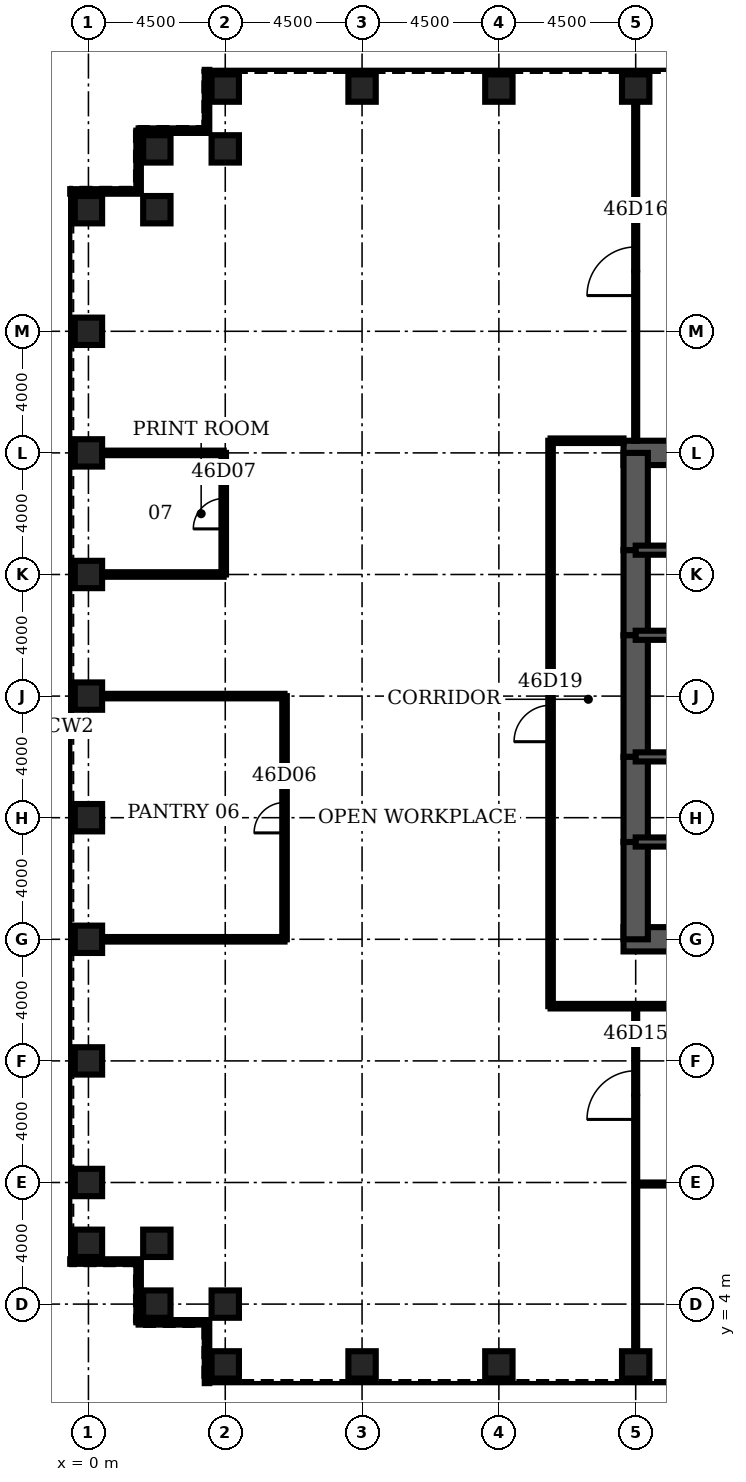
"""IFC4 building model, lengths in metres.
Left out: names, types, materials, properties, quantities, classifications, styles, units other than length and angle.
Written with IfcOpenShell. Run it as: python <this file> out.ifc"""

import sys

from ifc_helpers import new_model, si_unit, direction, frame, frame_2d, origin, origin_2d, place, context, subcontext, project, spatial, rectangle, hollow_rectangle, extrude, element, fill, save


model = new_model("IFC4")
c1 = context("Model", 3, precision=1e-05, world=origin(), true_north=direction((0.0, 1.0)))
c2 = subcontext(c1, "Body", "Model", "MODEL_VIEW")
j1 = project(units=[si_unit("LENGTHUNIT", "METRE"), si_unit("PLANEANGLEUNIT", "RADIAN")], contexts=[c1])
p1 = place(None, origin())
s1 = spatial("IfcSite", under=j1, at=p1, CompositionType="ELEMENT")
p2 = place(p1, origin())
s2 = spatial("IfcBuilding", under=s1, at=p2, CompositionType="ELEMENT")
p3 = place(p2, frame((0.0, 0.0, 206.8)))
s3 = spatial("IfcBuildingStorey", under=s2, at=p3, CompositionType="ELEMENT", Elevation=206.8)
for number, where, z_axis, x_axis in (
    (1, (4.5, 2.0, 0.0), (0.0, 0.0, 1.0), (0.0, 1.0, 0.0)),
    (2, (9.0, 2.0, 0.0), (0.0, 0.0, 1.0), (0.0, 1.0, 0.0)),
    (3, (13.5, 2.0, 0.0), (0.0, 0.0, 1.0), (0.0, 1.0, 0.0)),
    (4, (18.0, 2.0, 0.0), (0.0, 0.0, 1.0), (0.0, 1.0, 0.0)),
    (5, (18.0, 44.0, 0.0), (0.0, 0.0, 1.0), (0.0, 1.0, 0.0)),
    (6, (13.5, 44.0, 0.0), (0.0, 0.0, 1.0), (0.0, 1.0, 0.0)),
    (7, (9.0, 44.0, 0.0), (0.0, 0.0, 1.0), (0.0, 1.0, 0.0)),
    (8, (4.5, 44.0, 0.0), (0.0, 0.0, 1.0), (0.0, 1.0, 0.0)),
    (9, (4.5, 42.0, 0.0), (0.0, 0.0, 1.0), (0.0, 1.0, 0.0)),
    (10, (2.25, 42.0, 0.0), (0.0, 0.0, 1.0), (1.0, 0.0, 0.0)),
    (11, (2.25, 40.0, 0.0), (0.0, 0.0, 1.0), (1.0, 0.0, 0.0)),
    (12, (0.0, 40.0, 0.0), (0.0, 0.0, 1.0), (1.0, 0.0, 0.0)),
    (13, (0.0, 36.0, 0.0), (0.0, 0.0, 1.0), (1.0, 0.0, 0.0)),
    (14, (0.0, 32.0, 0.0), (0.0, 0.0, 1.0), (1.0, 0.0, 0.0)),
    (15, (0.0, 28.0, 0.0), (0.0, 0.0, 1.0), (1.0, 0.0, 0.0)),
    (16, (0.0, 24.0, 0.0), (0.0, 0.0, 1.0), (1.0, 0.0, 0.0)),
    (17, (0.0, 20.0, 0.0), (0.0, 0.0, 1.0), (1.0, 0.0, 0.0)),
    (18, (0.0, 16.0, 0.0), (0.0, 0.0, 1.0), (1.0, 0.0, 0.0)),
    (19, (0.0, 12.0, 0.0), (0.0, 0.0, 1.0), (1.0, 0.0, 0.0)),
    (20, (0.0, 8.0, 0.0), (0.0, 0.0, 1.0), (1.0, 0.0, 0.0)),
    (21, (0.0, 6.0, 0.0), (0.0, 0.0, 1.0), (1.0, 0.0, 0.0)),
    (22, (2.25, 6.0, 0.0), (0.0, 0.0, 1.0), (1.0, 0.0, 0.0)),
    (23, (2.25, 4.0, 0.0), (0.0, 0.0, 1.0), (1.0, 0.0, 0.0)),
    (24, (4.5, 4.0, 0.0), (0.0, 0.0, 1.0), (0.0, 1.0, 0.0)),
):
    element("IfcColumn", number, at=place(p3, frame(where, z_axis=z_axis, x_axis=x_axis)), inside=s3, PredefinedType="COLUMN", context=c2, shape_type="SweptSolid", body=[
        extrude(hollow_rectangle(XDim=0.9, YDim=0.9, WallThickness=0.08, at=origin_2d()), origin(), (0.0, 0.0, 1.0), 4.2),
    ])
for number, where, z_axis, x_axis in (
    (25, (17.6, 16.0, 0.0), (0.0, 0.0, 1.0), (1.0, 0.0, 0.0)),
    (26, (27.0, 32.0, 0.0), (0.0, 0.0, 1.0), (-1.0, 0.0, 0.0)),
):
    element("IfcWall", number, at=place(p3, frame(where, z_axis=z_axis, x_axis=x_axis)), inside=s3, PredefinedType="SHEAR", context=c2, shape_type="SweptSolid", body=[
        extrude(rectangle(XDim=9.4, YDim=0.8, at=frame_2d((4.7, 0.0))), origin(), (0.0, 0.0, 1.0), 4.2),
    ])
p4 = place(p3, frame((18.0, 32.0, 0.0), z_axis=(0.0, 0.0, 1.0), x_axis=(0.0, -1.0, 0.0)))
e27 = element("IfcWall", 27, at=p4, inside=s3, PredefinedType="SHEAR", context=c2, shape_type="SweptSolid", body=[
    extrude(rectangle(XDim=3.2, YDim=0.8, at=frame_2d((1.6, 0.0))), origin(), (0.0, 0.0, 1.0), 4.2),
])
p5 = place(p3, frame((18.0, 28.8, 0.0), z_axis=(0.0, 0.0, 1.0), x_axis=(0.0, -1.0, 0.0)))
e28 = element("IfcWall", 28, at=p5, inside=s3, PredefinedType="SHEAR", context=c2, shape_type="SweptSolid", body=[
    extrude(rectangle(XDim=2.8, YDim=0.8, at=frame_2d((1.4, 0.0))), origin(), (0.0, 0.0, 1.0), 4.2),
])
p6 = place(p5, frame((0.4, 0.0, 0.0)))
e29 = element("IfcOpeningElement", 29, at=p6, cuts=e28, PredefinedType="OPENING", context=c2, shape_type="SweptSolid", body=[
    extrude(rectangle(XDim=1.8, YDim=2.1, at=frame_2d((0.9, 1.05))), frame((0.0, 0.41, 0.0), z_axis=(0.0, -1.0, 0.0), x_axis=(1.0, 0.0, 0.0)), (0.0, 0.0, 1.0), 0.82),
])
p7 = place(p3, frame((18.0, 26.0, 0.0), z_axis=(0.0, 0.0, 1.0), x_axis=(0.0, -1.0, 0.0)))
e30 = element("IfcWall", 30, at=p7, inside=s3, PredefinedType="SHEAR", context=c2, shape_type="SweptSolid", body=[
    extrude(rectangle(XDim=4.0, YDim=0.8, at=frame_2d((2.0, 0.0))), origin(), (0.0, 0.0, 1.0), 4.2),
])
p8 = place(p3, frame((18.0, 22.0, 0.0), z_axis=(0.0, 0.0, 1.0), x_axis=(0.0, -1.0, 0.0)))
e31 = element("IfcWall", 31, at=p8, inside=s3, PredefinedType="SHEAR", context=c2, shape_type="SweptSolid", body=[
    extrude(rectangle(XDim=2.8, YDim=0.8, at=frame_2d((1.4, 0.0))), origin(), (0.0, 0.0, 1.0), 4.2),
])
p9 = place(p8, frame((0.6, 0.0, 0.0)))
e32 = element("IfcOpeningElement", 32, at=p9, cuts=e31, PredefinedType="OPENING", context=c2, shape_type="SweptSolid", body=[
    extrude(rectangle(XDim=1.8, YDim=2.1, at=frame_2d((0.9, 1.05))), frame((0.0, 0.41, 0.0), z_axis=(0.0, -1.0, 0.0), x_axis=(1.0, 0.0, 0.0)), (0.0, 0.0, 1.0), 0.82),
])
p10 = place(p3, frame((18.0, 19.2, 0.0), z_axis=(0.0, 0.0, 1.0), x_axis=(0.0, -1.0, 0.0)))
e33 = element("IfcWall", 33, at=p10, inside=s3, PredefinedType="SHEAR", context=c2, shape_type="SweptSolid", body=[
    extrude(rectangle(XDim=3.2, YDim=0.8, at=frame_2d((1.6, 0.0))), origin(), (0.0, 0.0, 1.0), 4.2),
])
p11 = place(p3, frame((18.0, 19.2, 0.0), z_axis=(0.0, 0.0, 1.0), x_axis=(1.0, 0.0, 0.0)))
e34 = element("IfcWall", 34, at=p11, inside=s3, PredefinedType="SOLIDWALL", context=c2, shape_type="SweptSolid", body=[
    extrude(rectangle(XDim=9.0, YDim=0.3, at=frame_2d((4.5, 0.0))), origin(), (0.0, 0.0, 1.0), 4.2),
])
p12 = place(p11, frame((0.65, 0.0, 0.0)))
e35 = element("IfcOpeningElement", 35, at=p12, cuts=e34, PredefinedType="OPENING", context=c2, shape_type="SweptSolid", body=[
    extrude(rectangle(XDim=1.0, YDim=2.1, at=frame_2d((0.5, 1.05))), frame((0.0, 0.16, 0.0), z_axis=(0.0, -1.0, 0.0), x_axis=(1.0, 0.0, 0.0)), (0.0, 0.0, 1.0), 0.32),
])
p13 = place(p3, frame((18.0, 28.8, 0.0), z_axis=(0.0, 0.0, 1.0), x_axis=(1.0, 0.0, 0.0)))
e36 = element("IfcWall", 36, at=p13, inside=s3, PredefinedType="SOLIDWALL", context=c2, shape_type="SweptSolid", body=[
    extrude(rectangle(XDim=9.0, YDim=0.3, at=frame_2d((4.5, 0.0))), origin(), (0.0, 0.0, 1.0), 4.2),
])
p14 = place(p13, frame((0.65, 0.0, 0.0)))
e37 = element("IfcOpeningElement", 37, at=p14, cuts=e36, PredefinedType="OPENING", context=c2, shape_type="SweptSolid", body=[
    extrude(rectangle(XDim=1.0, YDim=2.1, at=frame_2d((0.5, 1.05))), frame((0.0, 0.16, 0.0), z_axis=(0.0, -1.0, 0.0), x_axis=(1.0, 0.0, 0.0)), (0.0, 0.0, 1.0), 0.32),
])
p15 = place(p3, frame((18.0, 22.0, 0.0), z_axis=(0.0, 0.0, 1.0), x_axis=(1.0, 0.0, 0.0)))
e38 = element("IfcWall", 38, at=p15, inside=s3, PredefinedType="SOLIDWALL", context=c2, shape_type="SweptSolid", body=[
    extrude(rectangle(XDim=6.0, YDim=0.3, at=frame_2d((3.0, 0.0))), origin(), (0.0, 0.0, 1.0), 4.2),
])
p16 = place(p15, frame((4.4, 0.0, 0.0)))
e39 = element("IfcOpeningElement", 39, at=p16, cuts=e38, PredefinedType="OPENING", context=c2, shape_type="SweptSolid", body=[
    extrude(rectangle(XDim=1.0, YDim=2.1, at=frame_2d((0.5, 1.05))), frame((0.0, 0.16, 0.0), z_axis=(0.0, -1.0, 0.0), x_axis=(1.0, 0.0, 0.0)), (0.0, 0.0, 1.0), 0.32),
])
p17 = place(p15, frame((0.95, 0.0, 0.0)))
e40 = element("IfcOpeningElement", 40, at=p17, cuts=e38, PredefinedType="OPENING", context=c2, shape_type="SweptSolid", body=[
    extrude(rectangle(XDim=1.0, YDim=2.1, at=frame_2d((0.5, 1.05))), frame((0.0, 0.16, 0.0), z_axis=(0.0, -1.0, 0.0), x_axis=(1.0, 0.0, 0.0)), (0.0, 0.0, 1.0), 0.32),
])
p18 = place(p3, frame((18.0, 26.0, 0.0), z_axis=(0.0, 0.0, 1.0), x_axis=(1.0, 0.0, 0.0)))
e41 = element("IfcWall", 41, at=p18, inside=s3, PredefinedType="SOLIDWALL", context=c2, shape_type="SweptSolid", body=[
    extrude(rectangle(XDim=6.0, YDim=0.3, at=frame_2d((3.0, 0.0))), origin(), (0.0, 0.0, 1.0), 4.2),
])
p19 = place(p3, frame((18.0, 7.95, 0.0), z_axis=(0.0, 0.0, 1.0), x_axis=(1.0, 0.0, 0.0)))
e42 = element("IfcWall", 42, at=p19, inside=s3, PredefinedType="PARTITIONING", context=c2, shape_type="SweptSolid", body=[
    extrude(rectangle(XDim=27.0, YDim=0.1, at=frame_2d((13.5, 0.0))), origin(), (0.0, 0.0, 1.0), 3.0),
])
p20 = place(p19, frame((4.0, 0.0, 0.0)))
e43 = element("IfcOpeningElement", 43, at=p20, cuts=e42, PredefinedType="OPENING", context=c2, shape_type="SweptSolid", body=[
    extrude(rectangle(XDim=1.0, YDim=2.1, at=frame_2d((0.5, 1.05))), frame((0.0, 0.06, 0.0), z_axis=(0.0, -1.0, 0.0), x_axis=(1.0, 0.0, 0.0)), (0.0, 0.0, 1.0), 0.12),
])
p21 = place(p19, frame((13.0, 0.0, 0.0)))
e44 = element("IfcOpeningElement", 44, at=p21, cuts=e42, PredefinedType="OPENING", context=c2, shape_type="SweptSolid", body=[
    extrude(rectangle(XDim=1.0, YDim=2.1, at=frame_2d((0.5, 1.05))), frame((0.0, 0.06, 0.0), z_axis=(0.0, -1.0, 0.0), x_axis=(1.0, 0.0, 0.0)), (0.0, 0.0, 1.0), 0.12),
])
p22 = place(p19, frame((22.0, 0.0, 0.0)))
e45 = element("IfcOpeningElement", 45, at=p22, cuts=e42, PredefinedType="OPENING", context=c2, shape_type="SweptSolid", body=[
    extrude(rectangle(XDim=1.0, YDim=2.1, at=frame_2d((0.5, 1.05))), frame((0.0, 0.06, 0.0), z_axis=(0.0, -1.0, 0.0), x_axis=(1.0, 0.0, 0.0)), (0.0, 0.0, 1.0), 0.12),
])
p23 = place(p3, frame((15.2, 13.8, 0.0), z_axis=(0.0, 0.0, 1.0), x_axis=(1.0, 0.0, 0.0)))
e46 = element("IfcWall", 46, at=p23, inside=s3, PredefinedType="PARTITIONING", context=c2, shape_type="SweptSolid", body=[
    extrude(rectangle(XDim=41.6, YDim=0.15, at=frame_2d((20.8, 0.0))), origin(), (0.0, 0.0, 1.0), 3.0),
])
p24 = place(p23, frame((20.2, 0.0, 0.0)))
e47 = element("IfcOpeningElement", 47, at=p24, cuts=e46, PredefinedType="OPENING", context=c2, shape_type="SweptSolid", body=[
    extrude(rectangle(XDim=1.2, YDim=2.1, at=frame_2d((0.6, 1.05))), frame((0.0, 0.085, 0.0), z_axis=(0.0, -1.0, 0.0), x_axis=(1.0, 0.0, 0.0)), (0.0, 0.0, 1.0), 0.17),
])
for number, where, z_axis, x_axis in (
    (48, (0.45, 16.0, 0.0), (0.0, 0.0, 1.0), (1.0, 0.0, 0.0)),
    (49, (0.45, 24.0, 0.0), (0.0, 0.0, 1.0), (1.0, 0.0, 0.0)),
):
    element("IfcWall", number, at=place(p3, frame(where, z_axis=z_axis, x_axis=x_axis)), inside=s3, PredefinedType="PARTITIONING", context=c2, shape_type="SweptSolid", body=[
        extrude(rectangle(XDim=6.0, YDim=0.15, at=frame_2d((3.0, 0.0))), origin(), (0.0, 0.0, 1.0), 3.0),
    ])
for number, where, z_axis, x_axis in (
    (50, (0.45, 28.0, 0.0), (0.0, 0.0, 1.0), (1.0, 0.0, 0.0)),
    (51, (0.45, 32.0, 0.0), (0.0, 0.0, 1.0), (1.0, 0.0, 0.0)),
):
    element("IfcWall", number, at=place(p3, frame(where, z_axis=z_axis, x_axis=x_axis)), inside=s3, PredefinedType="PARTITIONING", context=c2, shape_type="SweptSolid", body=[
        extrude(rectangle(XDim=4.0, YDim=0.15, at=frame_2d((2.0, 0.0))), origin(), (0.0, 0.0, 1.0), 3.0),
    ])
p25 = place(p3, frame((15.2, 32.4, 0.0), z_axis=(0.0, 0.0, 1.0), x_axis=(1.0, 0.0, 0.0)))
e52 = element("IfcWall", 52, at=p25, inside=s3, PredefinedType="PARTITIONING", context=c2, shape_type="SweptSolid", body=[
    extrude(rectangle(XDim=2.4, YDim=0.15, at=frame_2d((1.2, 0.0))), origin(), (0.0, 0.0, 1.0), 3.0),
])
p26 = place(p3, frame((4.45, 28.0, 0.0), z_axis=(0.0, 0.0, 1.0), x_axis=(0.0, 1.0, 0.0)))
e53 = element("IfcWall", 53, at=p26, inside=s3, PredefinedType="PARTITIONING", context=c2, shape_type="SweptSolid", body=[
    extrude(rectangle(XDim=4.0, YDim=0.15, at=frame_2d((2.0, 0.0))), origin(), (0.0, 0.0, 1.0), 3.0),
])
p27 = place(p26, frame((1.5, 0.0, 0.0)))
e54 = element("IfcOpeningElement", 54, at=p27, cuts=e53, PredefinedType="OPENING", context=c2, shape_type="SweptSolid", body=[
    extrude(rectangle(XDim=1.0, YDim=2.1, at=frame_2d((0.5, 1.05))), frame((0.0, 0.085, 0.0), z_axis=(0.0, -1.0, 0.0), x_axis=(1.0, 0.0, 0.0)), (0.0, 0.0, 1.0), 0.17),
])
p28 = place(p3, frame((6.45, 16.0, 0.0), z_axis=(0.0, 0.0, 1.0), x_axis=(0.0, 1.0, 0.0)))
e55 = element("IfcWall", 55, at=p28, inside=s3, PredefinedType="PARTITIONING", context=c2, shape_type="SweptSolid", body=[
    extrude(rectangle(XDim=8.0, YDim=0.15, at=frame_2d((4.0, 0.0))), origin(), (0.0, 0.0, 1.0), 3.0),
])
p29 = place(p28, frame((3.5, 0.0, 0.0)))
e56 = element("IfcOpeningElement", 56, at=p29, cuts=e55, PredefinedType="OPENING", context=c2, shape_type="SweptSolid", body=[
    extrude(rectangle(XDim=1.0, YDim=2.1, at=frame_2d((0.5, 1.05))), frame((0.0, 0.085, 0.0), z_axis=(0.0, -1.0, 0.0), x_axis=(1.0, 0.0, 0.0)), (0.0, 0.0, 1.0), 0.17),
])
p30 = place(p3, frame((15.2, 13.8, 0.0), z_axis=(0.0, 0.0, 1.0), x_axis=(0.0, 1.0, 0.0)))
e57 = element("IfcWall", 57, at=p30, inside=s3, PredefinedType="PARTITIONING", context=c2, shape_type="SweptSolid", body=[
    extrude(rectangle(XDim=18.6, YDim=0.15, at=frame_2d((9.3, 0.0))), origin(), (0.0, 0.0, 1.0), 3.0),
])
p31 = place(p30, frame((8.7, 0.0, 0.0)))
e58 = element("IfcOpeningElement", 58, at=p31, cuts=e57, PredefinedType="OPENING", context=c2, shape_type="SweptSolid", body=[
    extrude(rectangle(XDim=1.2, YDim=2.1, at=frame_2d((0.6, 1.05))), frame((0.0, 0.085, 0.0), z_axis=(0.0, -1.0, 0.0), x_axis=(1.0, 0.0, 0.0)), (0.0, 0.0, 1.0), 0.17),
])
p32 = place(p3, frame((18.0, 2.45, 0.0), z_axis=(0.0, 0.0, 1.0), x_axis=(0.0, 1.0, 0.0)))
e59 = element("IfcWall", 59, at=p32, inside=s3, PredefinedType="PARTITIONING", context=c2, shape_type="SweptSolid", body=[
    extrude(rectangle(XDim=11.35, YDim=0.1, at=frame_2d((5.675, 0.0))), origin(), (0.0, 0.0, 1.0), 3.0),
])
p33 = place(p32, frame((7.625, 0.0, 0.0)))
e60 = element("IfcOpeningElement", 60, at=p33, cuts=e59, PredefinedType="OPENING", context=c2, shape_type="SweptSolid", body=[
    extrude(rectangle(XDim=1.6, YDim=2.1, at=frame_2d((0.8, 1.05))), frame((0.0, 0.06, 0.0), z_axis=(0.0, -1.0, 0.0), x_axis=(1.0, 0.0, 0.0)), (0.0, 0.0, 1.0), 0.12),
])
p34 = place(p3, frame((18.0, 32.4, 0.0), z_axis=(0.0, 0.0, 1.0), x_axis=(0.0, 1.0, 0.0)))
e61 = element("IfcWall", 61, at=p34, inside=s3, PredefinedType="PARTITIONING", context=c2, shape_type="SweptSolid", body=[
    extrude(rectangle(XDim=11.15, YDim=0.1, at=frame_2d((5.575, 0.0))), origin(), (0.0, 0.0, 1.0), 3.0),
])
p35 = place(p34, frame((4.775, 0.0, 0.0)))
e62 = element("IfcOpeningElement", 62, at=p35, cuts=e61, PredefinedType="OPENING", context=c2, shape_type="SweptSolid", body=[
    extrude(rectangle(XDim=1.6, YDim=2.1, at=frame_2d((0.8, 1.05))), frame((0.0, 0.06, 0.0), z_axis=(0.0, -1.0, 0.0), x_axis=(1.0, 0.0, 0.0)), (0.0, 0.0, 1.0), 0.12),
])
p36 = place(p3, frame((3.9, 44.6, 0.0), z_axis=(0.0, 0.0, 1.0), x_axis=(0.0, -1.0, 0.0)))
e63 = element("IfcWall", 63, at=p36, inside=s3, PredefinedType="ELEMENTEDWALL", context=c2, shape_type="SweptSolid", body=[
    extrude(rectangle(XDim=2.0, YDim=0.15, at=frame_2d((1.0, 0.0))), origin(), (0.0, 0.0, 1.0), 4.04),
])
p37 = place(p3, frame((3.9, 42.6, 0.0), z_axis=(0.0, 0.0, 1.0), x_axis=(-1.0, 0.0, 0.0)))
e64 = element("IfcWall", 64, at=p37, inside=s3, PredefinedType="ELEMENTEDWALL", context=c2, shape_type="SweptSolid", body=[
    extrude(rectangle(XDim=2.25, YDim=0.15, at=frame_2d((1.125, 0.0))), origin(), (0.0, 0.0, 1.0), 4.04),
])
p38 = place(p3, frame((1.65, 42.6, 0.0), z_axis=(0.0, 0.0, 1.0), x_axis=(0.0, -1.0, 0.0)))
e65 = element("IfcWall", 65, at=p38, inside=s3, PredefinedType="ELEMENTEDWALL", context=c2, shape_type="SweptSolid", body=[
    extrude(rectangle(XDim=2.0, YDim=0.15, at=frame_2d((1.0, 0.0))), origin(), (0.0, 0.0, 1.0), 4.04),
])
for number, where, z_axis, x_axis in (
    (66, (1.65, 40.6, 0.0), (0.0, 0.0, 1.0), (-1.0, 0.0, 0.0)),
    (67, (-0.6, 5.4, 0.0), (0.0, 0.0, 1.0), (1.0, 0.0, 0.0)),
):
    element("IfcWall", number, at=place(p3, frame(where, z_axis=z_axis, x_axis=x_axis)), inside=s3, PredefinedType="ELEMENTEDWALL", context=c2, shape_type="SweptSolid", body=[
        extrude(rectangle(XDim=2.25, YDim=0.15, at=frame_2d((1.125, 0.0))), origin(), (0.0, 0.0, 1.0), 4.04),
    ])
p39 = place(p3, frame((1.65, 5.4, 0.0), z_axis=(0.0, 0.0, 1.0), x_axis=(0.0, -1.0, 0.0)))
e68 = element("IfcWall", 68, at=p39, inside=s3, PredefinedType="ELEMENTEDWALL", context=c2, shape_type="SweptSolid", body=[
    extrude(rectangle(XDim=2.0, YDim=0.15, at=frame_2d((1.0, 0.0))), origin(), (0.0, 0.0, 1.0), 4.04),
])
p40 = place(p3, frame((1.65, 3.4, 0.0), z_axis=(0.0, 0.0, 1.0), x_axis=(1.0, 0.0, 0.0)))
e69 = element("IfcWall", 69, at=p40, inside=s3, PredefinedType="ELEMENTEDWALL", context=c2, shape_type="SweptSolid", body=[
    extrude(rectangle(XDim=2.25, YDim=0.15, at=frame_2d((1.125, 0.0))), origin(), (0.0, 0.0, 1.0), 4.04),
])
p41 = place(p3, frame((3.9, 3.4, 0.0), z_axis=(0.0, 0.0, 1.0), x_axis=(0.0, -1.0, 0.0)))
e70 = element("IfcWall", 70, at=p41, inside=s3, PredefinedType="ELEMENTEDWALL", context=c2, shape_type="SweptSolid", body=[
    extrude(rectangle(XDim=2.0, YDim=0.15, at=frame_2d((1.0, 0.0))), origin(), (0.0, 0.0, 1.0), 4.04),
])
p42 = place(p29, origin())
e71 = element("IfcDoor", 71, at=p42, inside=s3, OperationType="SINGLE_SWING_LEFT", PredefinedType="DOOR", context=c2, shape_type="SweptSolid", body=[
    extrude(rectangle(XDim=1.0, YDim=2.1, at=frame_2d((0.5, 1.05))), frame((0.0, 0.025, 0.0), z_axis=(0.0, -1.0, 0.0), x_axis=(1.0, 0.0, 0.0)), (0.0, 0.0, 1.0), 0.05),
])
fill(e56, e71)
p43 = place(p27, origin())
e72 = element("IfcDoor", 72, at=p43, inside=s3, OperationType="SINGLE_SWING_LEFT", PredefinedType="DOOR", context=c2, shape_type="SweptSolid", body=[
    extrude(rectangle(XDim=1.0, YDim=2.1, at=frame_2d((0.5, 1.05))), frame((0.0, 0.025, 0.0), z_axis=(0.0, -1.0, 0.0), x_axis=(1.0, 0.0, 0.0)), (0.0, 0.0, 1.0), 0.05),
])
fill(e54, e72)
p44 = place(p33, origin())
e73 = element("IfcDoor", 73, at=p44, inside=s3, OperationType="SINGLE_SWING_LEFT", PredefinedType="DOOR", context=c2, shape_type="SweptSolid", body=[
    extrude(rectangle(XDim=1.6, YDim=2.1, at=frame_2d((0.8, 1.05))), frame((0.0, 0.025, 0.0), z_axis=(0.0, -1.0, 0.0), x_axis=(1.0, 0.0, 0.0)), (0.0, 0.0, 1.0), 0.05),
])
fill(e60, e73)
p45 = place(p35, origin())
e74 = element("IfcDoor", 74, at=p45, inside=s3, OperationType="SINGLE_SWING_LEFT", PredefinedType="DOOR", context=c2, shape_type="SweptSolid", body=[
    extrude(rectangle(XDim=1.6, YDim=2.1, at=frame_2d((0.8, 1.05))), frame((0.0, 0.025, 0.0), z_axis=(0.0, -1.0, 0.0), x_axis=(1.0, 0.0, 0.0)), (0.0, 0.0, 1.0), 0.05),
])
fill(e62, e74)
p46 = place(p31, origin())
e75 = element("IfcDoor", 75, at=p46, inside=s3, OperationType="SINGLE_SWING_LEFT", PredefinedType="DOOR", context=c2, shape_type="SweptSolid", body=[
    extrude(rectangle(XDim=1.2, YDim=2.1, at=frame_2d((0.6, 1.05))), frame((0.0, 0.025, 0.0), z_axis=(0.0, -1.0, 0.0), x_axis=(1.0, 0.0, 0.0)), (0.0, 0.0, 1.0), 0.05),
])
fill(e58, e75)
p47 = place(p12, origin())
e76 = element("IfcDoor", 76, at=p47, inside=s3, OperationType="SINGLE_SWING_LEFT", PredefinedType="DOOR", context=c2, shape_type="SweptSolid", body=[
    extrude(rectangle(XDim=1.0, YDim=2.1, at=frame_2d((0.5, 1.05))), frame((0.0, 0.025, 0.0), z_axis=(0.0, -1.0, 0.0), x_axis=(1.0, 0.0, 0.0)), (0.0, 0.0, 1.0), 0.05),
])
fill(e35, e76)
p48 = place(p14, origin())
e77 = element("IfcDoor", 77, at=p48, inside=s3, OperationType="SINGLE_SWING_LEFT", PredefinedType="DOOR", context=c2, shape_type="SweptSolid", body=[
    extrude(rectangle(XDim=1.0, YDim=2.1, at=frame_2d((0.5, 1.05))), frame((0.0, 0.025, 0.0), z_axis=(0.0, -1.0, 0.0), x_axis=(1.0, 0.0, 0.0)), (0.0, 0.0, 1.0), 0.05),
])
fill(e37, e77)
p49 = place(p9, origin())
e78 = element("IfcDoor", 78, at=p49, inside=s3, OperationType="SINGLE_SWING_LEFT", PredefinedType="DOOR", context=c2, shape_type="SweptSolid", body=[
    extrude(rectangle(XDim=1.8, YDim=2.1, at=frame_2d((0.9, 1.05))), frame((0.0, 0.4, 0.0), z_axis=(0.0, -1.0, 0.0), x_axis=(1.0, 0.0, 0.0)), (0.0, 0.0, 1.0), 0.8),
])
fill(e32, e78)
p50 = place(p6, origin())
e79 = element("IfcDoor", 79, at=p50, inside=s3, OperationType="SINGLE_SWING_LEFT", PredefinedType="DOOR", context=c2, shape_type="SweptSolid", body=[
    extrude(rectangle(XDim=1.8, YDim=2.1, at=frame_2d((0.9, 1.05))), frame((0.0, 0.4, 0.0), z_axis=(0.0, -1.0, 0.0), x_axis=(1.0, 0.0, 0.0)), (0.0, 0.0, 1.0), 0.8),
])
fill(e29, e79)
p51 = place(p17, origin())
e80 = element("IfcDoor", 80, at=p51, inside=s3, OperationType="SINGLE_SWING_LEFT", PredefinedType="DOOR", context=c2, shape_type="SweptSolid", body=[
    extrude(rectangle(XDim=1.0, YDim=2.1, at=frame_2d((0.5, 1.05))), frame((0.0, 0.025, 0.0), z_axis=(0.0, -1.0, 0.0), x_axis=(1.0, 0.0, 0.0)), (0.0, 0.0, 1.0), 0.05),
])
fill(e40, e80)
save(model, sys.argv[1])
